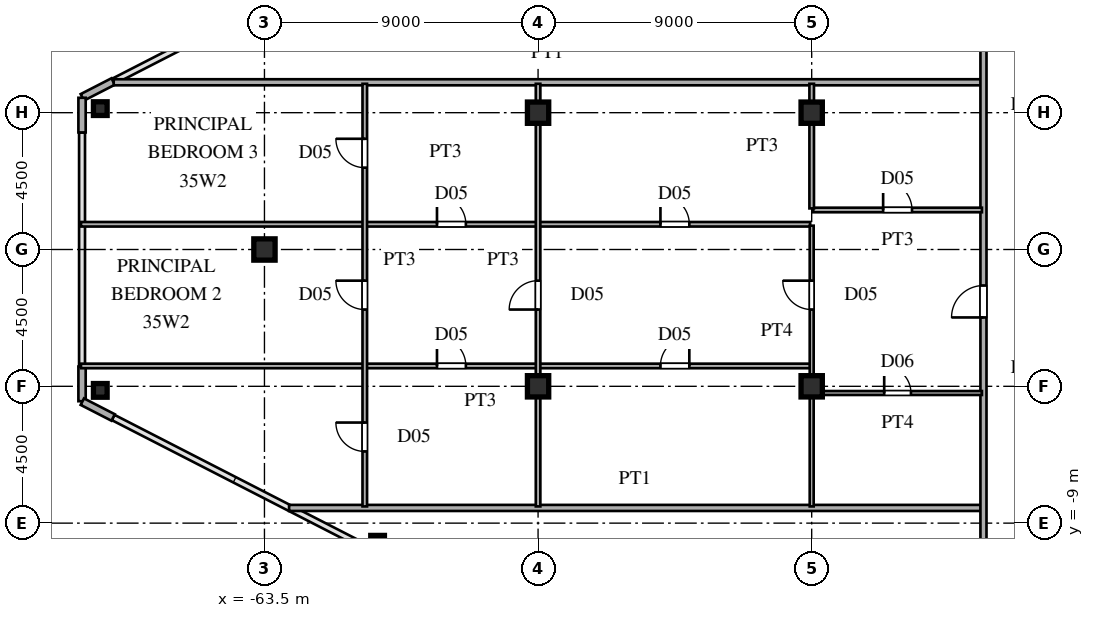
"""IFC4 building model, lengths in metres.
Left out: names, types, materials, properties, quantities, classifications, styles, units other than length and angle.
Written with IfcOpenShell. Run it as: python <this file> out.ifc"""

import sys

from ifc_helpers import new_model, si_unit, direction, frame, frame_2d, origin, origin_2d, place, context, subcontext, project, spatial, rectangle, hollow_rectangle, i_section, extrude, source, transform, mapped, element, fill, save


model = new_model("IFC4")
c1 = context("Model", 3, precision=1e-05, world=origin(), true_north=direction((0.0, 1.0)))
c2 = subcontext(c1, "Body", "Model", "MODEL_VIEW")
j1 = project(units=[si_unit("LENGTHUNIT", "METRE"), si_unit("PLANEANGLEUNIT", "RADIAN")], contexts=[c1])
p1 = place(None, origin())
s1 = spatial("IfcSite", under=j1, at=p1, CompositionType="ELEMENT")
p2 = place(p1, origin())
s2 = spatial("IfcBuilding", under=s1, at=p2, CompositionType="ELEMENT")
p3 = place(p2, frame((0.0, 0.0, 132.0)))
s3 = spatial("IfcBuildingStorey", under=s2, at=p3, CompositionType="ELEMENT", Elevation=132.0)
m1 = source(origin(), c2, "Body", "SweptSolid", [
    extrude(i_section(OverallWidth=0.7, OverallDepth=0.7, WebThickness=0.028, FlangeThickness=0.045, at=origin_2d()), origin(), (0.0, 0.0, 1.0), 3.6),
])
for number, where, z_axis, x_axis in (
    (1, (-45.5, -4.5, 0.0), (0.0, 0.0, 1.0), (1.0, 0.0, 0.0)),
    (2, (-45.5, 4.5, 0.0), (0.0, 0.0, 1.0), (1.0, 0.0, 0.0)),
    (3, (-54.5, -4.5, 0.0), (0.0, 0.0, 1.0), (1.0, 0.0, 0.0)),
    (4, (-54.5, 4.5, 0.0), (0.0, 0.0, 1.0), (1.0, 0.0, 0.0)),
    (5, (-63.5, 0.0, 0.0), (0.0, 0.0, 1.0), (1.0, 0.0, 0.0)),
):
    element("IfcColumn", number, at=place(p3, frame(where, z_axis=z_axis, x_axis=x_axis)), inside=s3, PredefinedType="COLUMN", context=c2, shape_type="MappedRepresentation", body=[
        mapped(m1, transform((0.0, 0.0, 0.0), scale=1.0)),
    ])
m2 = source(origin(), c2, "Body", "SweptSolid", [
    extrude(hollow_rectangle(XDim=0.45, YDim=0.45, WallThickness=0.018, at=origin_2d()), origin(), (0.0, 0.0, 1.0), 3.6),
])
for number, where, z_axis, x_axis in (
    (6, (-68.9, 4.634, 0.0), (0.0, 0.0, 1.0), (1.0, 0.0, 0.0)),
    (7, (-68.9, -4.634, 0.0), (0.0, 0.0, 1.0), (1.0, 0.0, 0.0)),
    (8, (-59.779, -9.629, 0.0), (0.0, 0.0, 1.0), (1.0, 0.0, 0.0)),
):
    element("IfcColumn", number, at=place(p3, frame(where, z_axis=z_axis, x_axis=x_axis)), inside=s3, PredefinedType="COLUMN", context=c2, shape_type="MappedRepresentation", body=[
        mapped(m2, transform((0.0, 0.0, 0.0), scale=1.0)),
    ])
p4 = place(p3, frame((-68.477, 5.525, 0.0), z_axis=(0.0, 0.0, 1.0), x_axis=(-0.889797395748, -0.456355776255, 0.0)))
e9 = element("IfcWall", 9, at=p4, inside=s3, PredefinedType="SOLIDWALL", context=c2, shape_type="SweptSolid", body=[
    extrude(rectangle(XDim=1.14, YDim=0.24, at=frame_2d((0.57, 0.0))), origin(), (0.0, 0.0, 1.0), 3.34),
])
for number, where, z_axis, x_axis in (
    (10, (-69.5, 4.99, 0.0), (0.0, 0.0, 1.0), (0.0, -1.0, 0.0)),
    (11, (-69.5, -3.85, 0.0), (0.0, 0.0, 1.0), (0.0, -1.0, 0.0)),
):
    element("IfcWall", number, at=place(p3, frame(where, z_axis=z_axis, x_axis=x_axis)), inside=s3, PredefinedType="SOLIDWALL", context=c2, shape_type="SweptSolid", body=[
        extrude(rectangle(XDim=1.14, YDim=0.24, at=frame_2d((0.57, 0.0))), origin(), (0.0, 0.0, 1.0), 3.34),
    ])
p5 = place(p3, frame((-69.491, -5.005, 0.0), z_axis=(0.0, 0.0, 1.0), x_axis=(0.889797395748, -0.456355776255, 0.0)))
e12 = element("IfcWall", 12, at=p5, inside=s3, PredefinedType="SOLIDWALL", context=c2, shape_type="SweptSolid", body=[
    extrude(rectangle(XDim=1.14, YDim=0.24, at=frame_2d((0.57, 0.0))), origin(), (0.0, 0.0, 1.0), 3.34),
])
p6 = place(p3, frame((-62.69, -8.5, 0.0), z_axis=(0.0, 0.0, 1.0), x_axis=(1.0, 0.0, 0.0)))
e13 = element("IfcWall", 13, at=p6, inside=s3, PredefinedType="PARTITIONING", context=c2, shape_type="SweptSolid", body=[
    extrude(rectangle(XDim=22.76, YDim=0.2, at=frame_2d((11.38, 0.0))), origin(), (0.0, 0.0, 1.0), 3.34),
])
p7 = place(p3, frame((-45.45, -4.72, 0.0), z_axis=(0.0, 0.0, 1.0), x_axis=(1.0, 0.0, 0.0)))
e14 = element("IfcWall", 14, at=p7, inside=s3, PredefinedType="PARTITIONING", context=c2, shape_type="SweptSolid", body=[
    extrude(rectangle(XDim=5.55, YDim=0.13, at=frame_2d((2.775, 0.0))), origin(), (0.0, 0.0, 1.0), 3.34),
])
p8 = place(p7, frame((2.335, 0.0, 0.0)))
e15 = element("IfcOpeningElement", 15, at=p8, cuts=e14, PredefinedType="OPENING", context=c2, shape_type="SweptSolid", body=[
    extrude(rectangle(XDim=0.88, YDim=2.1, at=frame_2d((0.44, 1.05))), frame((0.0, 0.075, 0.0), z_axis=(0.0, -1.0, 0.0), x_axis=(1.0, 0.0, 0.0)), (0.0, 0.0, 1.0), 0.15),
])
p9 = place(p3, frame((-69.535, -3.83, 0.0), z_axis=(0.0, 0.0, 1.0), x_axis=(1.0, 0.0, 0.0)))
e16 = element("IfcWall", 16, at=p9, inside=s3, PredefinedType="PARTITIONING", context=c2, shape_type="SweptSolid", body=[
    extrude(rectangle(XDim=23.985, YDim=0.15, at=frame_2d((11.992, 0.0))), origin(), (0.0, 0.0, 1.0), 3.34),
])
p10 = place(p9, frame((19.06, 0.0, 0.0)))
e17 = element("IfcOpeningElement", 17, at=p10, cuts=e16, PredefinedType="OPENING", context=c2, shape_type="SweptSolid", body=[
    extrude(rectangle(XDim=0.95, YDim=2.15, at=frame_2d((0.475, 1.075))), frame((0.0, 0.085, 0.0), z_axis=(0.0, -1.0, 0.0), x_axis=(1.0, 0.0, 0.0)), (0.0, 0.0, 1.0), 0.17),
])
p11 = place(p9, frame((11.71, 0.0, 0.0)))
e18 = element("IfcOpeningElement", 18, at=p11, cuts=e16, PredefinedType="OPENING", context=c2, shape_type="SweptSolid", body=[
    extrude(rectangle(XDim=0.95, YDim=2.15, at=frame_2d((0.475, 1.075))), frame((0.0, 0.085, 0.0), z_axis=(0.0, -1.0, 0.0), x_axis=(1.0, 0.0, 0.0)), (0.0, 0.0, 1.0), 0.17),
])
p12 = place(p3, frame((-69.535, 0.83, 0.0), z_axis=(0.0, 0.0, 1.0), x_axis=(1.0, 0.0, 0.0)))
e19 = element("IfcWall", 19, at=p12, inside=s3, PredefinedType="PARTITIONING", context=c2, shape_type="SweptSolid", body=[
    extrude(rectangle(XDim=23.985, YDim=0.15, at=frame_2d((11.992, 0.0))), origin(), (0.0, 0.0, 1.0), 3.34),
])
p13 = place(p12, frame((19.06, 0.0, 0.0)))
e20 = element("IfcOpeningElement", 20, at=p13, cuts=e19, PredefinedType="OPENING", context=c2, shape_type="SweptSolid", body=[
    extrude(rectangle(XDim=0.95, YDim=2.15, at=frame_2d((0.475, 1.075))), frame((0.0, 0.085, 0.0), z_axis=(0.0, -1.0, 0.0), x_axis=(1.0, 0.0, 0.0)), (0.0, 0.0, 1.0), 0.17),
])
p14 = place(p12, frame((11.71, 0.0, 0.0)))
e21 = element("IfcOpeningElement", 21, at=p14, cuts=e19, PredefinedType="OPENING", context=c2, shape_type="SweptSolid", body=[
    extrude(rectangle(XDim=0.95, YDim=2.15, at=frame_2d((0.475, 1.075))), frame((0.0, 0.085, 0.0), z_axis=(0.0, -1.0, 0.0), x_axis=(1.0, 0.0, 0.0)), (0.0, 0.0, 1.0), 0.17),
])
p15 = place(p3, frame((-45.45, 1.3, 0.0), z_axis=(0.0, 0.0, 1.0), x_axis=(1.0, 0.0, 0.0)))
e22 = element("IfcWall", 22, at=p15, inside=s3, PredefinedType="PARTITIONING", context=c2, shape_type="SweptSolid", body=[
    extrude(rectangle(XDim=5.55, YDim=0.15, at=frame_2d((2.775, 0.0))), origin(), (0.0, 0.0, 1.0), 3.34),
])
p16 = place(p15, frame((2.3, 0.0, 0.0)))
e23 = element("IfcOpeningElement", 23, at=p16, cuts=e22, PredefinedType="OPENING", context=c2, shape_type="SweptSolid", body=[
    extrude(rectangle(XDim=0.95, YDim=2.15, at=frame_2d((0.475, 1.075))), frame((0.0, 0.085, 0.0), z_axis=(0.0, -1.0, 0.0), x_axis=(1.0, 0.0, 0.0)), (0.0, 0.0, 1.0), 0.17),
])
p17 = place(p3, frame((-68.458, 5.5, 0.0), z_axis=(0.0, 0.0, 1.0), x_axis=(1.0, 0.0, 0.0)))
e24 = element("IfcWall", 24, at=p17, inside=s3, PredefinedType="PARTITIONING", context=c2, shape_type="SweptSolid", body=[
    extrude(rectangle(XDim=28.529, YDim=0.2, at=frame_2d((14.264, 0.0))), origin(), (0.0, 0.0, 1.0), 3.34),
])
p18 = place(p3, frame((-60.2, -8.45, 0.0), z_axis=(0.0, 0.0, 1.0), x_axis=(0.0, 1.0, 0.0)))
e25 = element("IfcWall", 25, at=p18, inside=s3, PredefinedType="PARTITIONING", context=c2, shape_type="SweptSolid", body=[
    extrude(rectangle(XDim=13.9, YDim=0.15, at=frame_2d((6.95, 0.0))), origin(), (0.0, 0.0, 1.0), 3.34),
])
p19 = place(p18, frame((1.808, 0.0, 0.0)))
e26 = element("IfcOpeningElement", 26, at=p19, cuts=e25, PredefinedType="OPENING", context=c2, shape_type="SweptSolid", body=[
    extrude(rectangle(XDim=0.95, YDim=2.15, at=frame_2d((0.475, 1.075))), frame((0.0, 0.085, 0.0), z_axis=(0.0, -1.0, 0.0), x_axis=(1.0, 0.0, 0.0)), (0.0, 0.0, 1.0), 0.17),
])
p20 = place(p18, frame((6.475, 0.0, 0.0)))
e27 = element("IfcOpeningElement", 27, at=p20, cuts=e25, PredefinedType="OPENING", context=c2, shape_type="SweptSolid", body=[
    extrude(rectangle(XDim=0.95, YDim=2.15, at=frame_2d((0.475, 1.075))), frame((0.0, 0.085, 0.0), z_axis=(0.0, -1.0, 0.0), x_axis=(1.0, 0.0, 0.0)), (0.0, 0.0, 1.0), 0.17),
])
p21 = place(p18, frame((11.142, 0.0, 0.0)))
e28 = element("IfcOpeningElement", 28, at=p21, cuts=e25, PredefinedType="OPENING", context=c2, shape_type="SweptSolid", body=[
    extrude(rectangle(XDim=0.95, YDim=2.15, at=frame_2d((0.475, 1.075))), frame((0.0, 0.085, 0.0), z_axis=(0.0, -1.0, 0.0), x_axis=(1.0, 0.0, 0.0)), (0.0, 0.0, 1.0), 0.17),
])
p22 = place(p3, frame((-54.5, -8.45, 0.0), z_axis=(0.0, 0.0, 1.0), x_axis=(0.0, 1.0, 0.0)))
e29 = element("IfcWall", 29, at=p22, inside=s3, PredefinedType="PARTITIONING", context=c2, shape_type="SweptSolid", body=[
    extrude(rectangle(XDim=3.93, YDim=0.15, at=frame_2d((1.965, 0.0))), origin(), (0.0, 0.0, 1.0), 3.34),
])
p23 = place(p3, frame((-54.5, -4.52, 0.0), z_axis=(0.0, 0.0, 1.0), x_axis=(0.0, 1.0, 0.0)))
e30 = element("IfcWall", 30, at=p23, inside=s3, PredefinedType="PARTITIONING", context=c2, shape_type="SweptSolid", body=[
    extrude(rectangle(XDim=9.04, YDim=0.15, at=frame_2d((4.52, 0.0))), origin(), (0.0, 0.0, 1.0), 2.44),
])
p24 = place(p23, frame((2.545, 0.0, 0.0)))
e31 = element("IfcOpeningElement", 31, at=p24, cuts=e30, PredefinedType="OPENING", context=c2, shape_type="SweptSolid", body=[
    extrude(rectangle(XDim=0.95, YDim=2.15, at=frame_2d((0.475, 1.075))), frame((0.0, 0.085, 0.0), z_axis=(0.0, -1.0, 0.0), x_axis=(1.0, 0.0, 0.0)), (0.0, 0.0, 1.0), 0.17),
])
p25 = place(p3, frame((-54.5, 4.52, 0.0), z_axis=(0.0, 0.0, 1.0), x_axis=(0.0, 1.0, 0.0)))
e32 = element("IfcWall", 32, at=p25, inside=s3, PredefinedType="PARTITIONING", context=c2, shape_type="SweptSolid", body=[
    extrude(rectangle(XDim=0.93, YDim=0.15, at=frame_2d((0.465, 0.0))), origin(), (0.0, 0.0, 1.0), 3.34),
])
p26 = place(p3, frame((-45.5, -8.45, 0.0), z_axis=(0.0, 0.0, 1.0), x_axis=(0.0, 1.0, 0.0)))
e33 = element("IfcWall", 33, at=p26, inside=s3, PredefinedType="PARTITIONING", context=c2, shape_type="SweptSolid", body=[
    extrude(rectangle(XDim=9.233, YDim=0.13, at=frame_2d((4.616, 0.0))), origin(), (0.0, 0.0, 1.0), 2.44),
])
p27 = place(p26, frame((6.475, 0.0, 0.0)))
e34 = element("IfcOpeningElement", 34, at=p27, cuts=e33, PredefinedType="OPENING", context=c2, shape_type="SweptSolid", body=[
    extrude(rectangle(XDim=0.95, YDim=2.15, at=frame_2d((0.475, 1.075))), frame((0.0, 0.075, 0.0), z_axis=(0.0, -1.0, 0.0), x_axis=(1.0, 0.0, 0.0)), (0.0, 0.0, 1.0), 0.15),
])
p28 = place(p3, frame((-45.5, 1.352, 0.0), z_axis=(0.0, 0.0, 1.0), x_axis=(0.0, 1.0, 0.0)))
e35 = element("IfcWall", 35, at=p28, inside=s3, PredefinedType="PARTITIONING", context=c2, shape_type="SweptSolid", body=[
    extrude(rectangle(XDim=4.098, YDim=0.15, at=frame_2d((2.049, 0.0))), origin(), (0.0, 0.0, 1.0), 2.44),
])
p29 = place(p3, frame((-39.85, -15.515, 0.0), z_axis=(0.0, 0.0, 1.0), x_axis=(0.0, 1.0, 0.0)))
e36 = element("IfcWall", 36, at=p29, inside=s3, PredefinedType="PARTITIONING", context=c2, shape_type="SweptSolid", body=[
    extrude(rectangle(XDim=31.03, YDim=0.2, at=frame_2d((15.515, 0.0))), origin(), (0.0, 0.0, 1.0), 3.34),
])
p30 = place(p29, frame((2.94, 0.0, 0.0)))
e37 = element("IfcOpeningElement", 37, at=p30, cuts=e36, PredefinedType="OPENING", context=c2, shape_type="SweptSolid", body=[
    extrude(rectangle(XDim=1.05, YDim=2.25, at=frame_2d((0.525, 1.125))), frame((0.0, 0.11, 0.0), z_axis=(0.0, -1.0, 0.0), x_axis=(1.0, 0.0, 0.0)), (0.0, 0.0, 1.0), 0.22),
])
p31 = place(p29, frame((13.28, 0.0, 0.0)))
e38 = element("IfcOpeningElement", 38, at=p31, cuts=e36, PredefinedType="OPENING", context=c2, shape_type="SweptSolid", body=[
    extrude(rectangle(XDim=1.05, YDim=2.25, at=frame_2d((0.525, 1.125))), frame((0.0, 0.11, 0.0), z_axis=(0.0, -1.0, 0.0), x_axis=(1.0, 0.0, 0.0)), (0.0, 0.0, 1.0), 0.22),
])
p32 = place(p29, frame((25.54, 0.0, 0.0)))
e39 = element("IfcOpeningElement", 39, at=p32, cuts=e36, PredefinedType="OPENING", context=c2, shape_type="SweptSolid", body=[
    extrude(rectangle(XDim=1.05, YDim=2.25, at=frame_2d((0.525, 1.125))), frame((0.0, 0.11, 0.0), z_axis=(0.0, -1.0, 0.0), x_axis=(1.0, 0.0, 0.0)), (0.0, 0.0, 1.0), 0.22),
])
m3 = source(origin(), c2, "Body", "SweptSolid", [
    extrude(rectangle(XDim=0.88, YDim=2.1, at=frame_2d((0.44, 1.05))), frame((0.0, 0.025, 0.0), z_axis=(0.0, -1.0, 0.0), x_axis=(1.0, 0.0, 0.0)), (0.0, 0.0, 1.0), 0.05),
])
p33 = place(p8, origin())
e40 = element("IfcDoor", 40, at=p33, inside=s3, OperationType="SINGLE_SWING_LEFT", PredefinedType="DOOR", context=c2, shape_type="MappedRepresentation", body=[
    mapped(m3, transform((0.0, 0.0, 0.0), scale=1.0)),
])
fill(e15, e40)
m4 = source(origin(), c2, "Body", "SweptSolid", [
    extrude(rectangle(XDim=0.95, YDim=2.15, at=frame_2d((0.475, 1.075))), frame((0.0, 0.025, 0.0), z_axis=(0.0, -1.0, 0.0), x_axis=(1.0, 0.0, 0.0)), (0.0, 0.0, 1.0), 0.05),
])
p34 = place(p10, origin())
e41 = element("IfcDoor", 41, at=p34, inside=s3, OperationType="SINGLE_SWING_RIGHT", PredefinedType="DOOR", context=c2, shape_type="MappedRepresentation", body=[
    mapped(m4, transform((0.0, 0.0, 0.0), scale=1.0)),
])
fill(e17, e41)
p35 = place(p11, origin())
e42 = element("IfcDoor", 42, at=p35, inside=s3, OperationType="SINGLE_SWING_LEFT", PredefinedType="DOOR", context=c2, shape_type="MappedRepresentation", body=[
    mapped(m4, transform((0.0, 0.0, 0.0), scale=1.0)),
])
fill(e18, e42)
p36 = place(p13, origin())
e43 = element("IfcDoor", 43, at=p36, inside=s3, OperationType="SINGLE_SWING_LEFT", PredefinedType="DOOR", context=c2, shape_type="MappedRepresentation", body=[
    mapped(m4, transform((0.0, 0.0, 0.0), scale=1.0)),
])
fill(e20, e43)
p37 = place(p14, origin())
e44 = element("IfcDoor", 44, at=p37, inside=s3, OperationType="SINGLE_SWING_LEFT", PredefinedType="DOOR", context=c2, shape_type="MappedRepresentation", body=[
    mapped(m4, transform((0.0, 0.0, 0.0), scale=1.0)),
])
fill(e21, e44)
p38 = place(p16, origin())
e45 = element("IfcDoor", 45, at=p38, inside=s3, OperationType="SINGLE_SWING_LEFT", PredefinedType="DOOR", context=c2, shape_type="MappedRepresentation", body=[
    mapped(m4, transform((0.0, 0.0, 0.0), scale=1.0)),
])
fill(e23, e45)
p39 = place(p19, origin())
e46 = element("IfcDoor", 46, at=p39, inside=s3, OperationType="SINGLE_SWING_RIGHT", PredefinedType="DOOR", context=c2, shape_type="MappedRepresentation", body=[
    mapped(m4, transform((0.0, 0.0, 0.0), scale=1.0)),
])
fill(e26, e46)
p40 = place(p20, origin())
e47 = element("IfcDoor", 47, at=p40, inside=s3, OperationType="SINGLE_SWING_RIGHT", PredefinedType="DOOR", context=c2, shape_type="MappedRepresentation", body=[
    mapped(m4, transform((0.0, 0.0, 0.0), scale=1.0)),
])
fill(e27, e47)
p41 = place(p21, origin())
e48 = element("IfcDoor", 48, at=p41, inside=s3, OperationType="SINGLE_SWING_RIGHT", PredefinedType="DOOR", context=c2, shape_type="MappedRepresentation", body=[
    mapped(m4, transform((0.0, 0.0, 0.0), scale=1.0)),
])
fill(e28, e48)
p42 = place(p24, origin())
e49 = element("IfcDoor", 49, at=p42, inside=s3, OperationType="SINGLE_SWING_LEFT", PredefinedType="DOOR", context=c2, shape_type="MappedRepresentation", body=[
    mapped(m4, transform((0.0, 0.0, 0.0), scale=1.0)),
])
fill(e31, e49)
p43 = place(p27, origin())
e50 = element("IfcDoor", 50, at=p43, inside=s3, OperationType="SINGLE_SWING_RIGHT", PredefinedType="DOOR", context=c2, shape_type="MappedRepresentation", body=[
    mapped(m4, transform((0.0, 0.0, 0.0), scale=1.0)),
])
fill(e34, e50)
m5 = source(origin(), c2, "Body", "SweptSolid", [
    extrude(rectangle(XDim=1.05, YDim=2.25, at=frame_2d((0.525, 1.125))), frame((0.0, 0.025, 0.0), z_axis=(0.0, -1.0, 0.0), x_axis=(1.0, 0.0, 0.0)), (0.0, 0.0, 1.0), 0.05),
])
p44 = place(p31, origin())
e51 = element("IfcDoor", 51, at=p44, inside=s3, OperationType="SINGLE_SWING_LEFT", PredefinedType="DOOR", context=c2, shape_type="MappedRepresentation", body=[
    mapped(m5, transform((0.0, 0.0, 0.0), scale=1.0)),
])
fill(e38, e51)
save(model, sys.argv[1])
